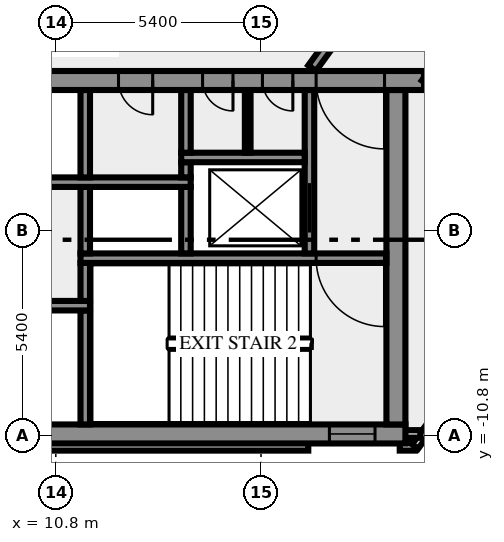
"""IFC4 building model, lengths in metres.
Left out: names, types, materials, properties, quantities, classifications, styles, units other than length and angle.
Written with IfcOpenShell. Run it as: python <this file> out.ifc"""

import sys

from ifc_helpers import new_model, si_unit, direction, frame, frame_2d, origin, place, context, subcontext, project, spatial, rectangle, extrude, element, fill, save


model = new_model("IFC4")
c1 = context("Model", 3, precision=1e-05, world=origin(), true_north=direction((0.0, 1.0)))
c2 = subcontext(c1, "Body", "Model", "MODEL_VIEW")
j1 = project(units=[si_unit("LENGTHUNIT", "METRE"), si_unit("PLANEANGLEUNIT", "RADIAN")], contexts=[c1])
p1 = place(None, origin())
s1 = spatial("IfcSite", under=j1, at=p1, CompositionType="ELEMENT")
p2 = place(p1, origin())
s2 = spatial("IfcBuilding", under=s1, at=p2, CompositionType="ELEMENT")
p3 = place(p2, frame((0.0, 0.0, 93.0)))
s3 = spatial("IfcBuildingStorey", under=s2, at=p3, CompositionType="ELEMENT", Elevation=93.0)
p4 = place(p3, frame((-17.444, -11.088, 0.0), z_axis=(0.0, 0.0, 1.0), x_axis=(1.0, 0.0, 0.0)))
e1 = element("IfcWall", 1, at=p4, inside=s3, PredefinedType="SOLIDWALL", context=c2, shape_type="SweptSolid", body=[
    extrude(rectangle(XDim=34.888, YDim=0.2, at=frame_2d((17.444, 0.0))), origin(), (0.0, 0.0, 1.0), 3.65),
])
p5 = place(p3, frame((19.85, -11.088, 0.0), z_axis=(0.0, 0.0, 1.0), x_axis=(1.0, 0.0, 0.0)))
e2 = element("IfcWall", 2, at=p5, inside=s3, PredefinedType="SOLIDWALL", context=c2, shape_type="SweptSolid", body=[
    extrude(rectangle(XDim=0.406, YDim=0.2, at=frame_2d((0.203, 0.0))), origin(), (0.0, 0.0, 1.0), 3.65),
])
p6 = place(p3, frame((20.253, -11.083, 0.0), z_axis=(0.0, 0.0, 1.0), x_axis=(0.587766567315, 0.809030569476, 0.0)))
e3 = element("IfcWall", 3, at=p6, inside=s3, PredefinedType="SOLIDWALL", context=c2, shape_type="SweptSolid", body=[
    extrude(rectangle(XDim=2.688, YDim=0.2, at=frame_2d((1.344, 0.0))), origin(), (0.0, 0.0, 1.0), 3.65),
])
p7 = place(p3, frame((19.98, -10.75, 0.0), z_axis=(0.0, 0.0, 1.0), x_axis=(1.0, 0.0, 0.0)))
e4 = element("IfcWall", 4, at=p7, inside=s3, PredefinedType="SOLIDWALL", context=c2, shape_type="SweptSolid", body=[
    extrude(rectangle(XDim=0.417, YDim=0.2, at=frame_2d((0.208, 0.0))), origin(), (0.0, 0.0, 1.0), 3.65),
])
p8 = place(p3, frame((-20.0, -10.75, 0.0), z_axis=(0.0, 0.0, 1.0), x_axis=(1.0, 0.0, 0.0)))
e5 = element("IfcWall", 5, at=p8, inside=s3, PredefinedType="SHEAR", context=c2, shape_type="SweptSolid", body=[
    extrude(rectangle(XDim=40.0, YDim=0.5, at=frame_2d((20.0, 0.0))), origin(), (0.0, 0.0, 1.0), 3.65),
])
p9 = place(p8, frame((0.8, 0.0, 1.0)))
e6 = element("IfcOpeningElement", 6, at=p9, cuts=e5, PredefinedType="OPENING", context=c2, shape_type="SweptSolid", body=[
    extrude(rectangle(XDim=1.2, YDim=1.2, at=frame_2d((0.6, 0.6))), frame((0.0, 0.26, 0.0), z_axis=(0.0, -1.0, 0.0), x_axis=(1.0, 0.0, 0.0)), (0.0, 0.0, 1.0), 0.52),
])
p10 = place(p8, frame((38.0, 0.0, 1.0)))
e7 = element("IfcOpeningElement", 7, at=p10, cuts=e5, PredefinedType="OPENING", context=c2, shape_type="SweptSolid", body=[
    extrude(rectangle(XDim=1.2, YDim=1.2, at=frame_2d((0.6, 0.6))), frame((0.0, 0.26, 0.0), z_axis=(0.0, -1.0, 0.0), x_axis=(1.0, 0.0, 0.0)), (0.0, 0.0, 1.0), 0.52),
])
p11 = place(p3, frame((11.575, -10.5, 0.0), z_axis=(0.0, 0.0, 1.0), x_axis=(0.0, 1.0, 0.0)))
e8 = element("IfcWall", 8, at=p11, inside=s3, PredefinedType="SHEAR", context=c2, shape_type="SweptSolid", body=[
    extrude(rectangle(XDim=3.0, YDim=0.25, at=frame_2d((1.5, 0.0))), origin(), (0.0, 0.0, 1.0), 3.65),
])
p12 = place(p3, frame((19.75, -10.5, 0.0), z_axis=(0.0, 0.0, 1.0), x_axis=(0.0, 1.0, 0.0)))
e9 = element("IfcWall", 9, at=p12, inside=s3, PredefinedType="SHEAR", context=c2, shape_type="SweptSolid", body=[
    extrude(rectangle(XDim=8.8, YDim=0.5, at=frame_2d((4.4, 0.0))), origin(), (0.0, 0.0, 1.0), 3.65),
])
p13 = place(p3, frame((11.7, -7.375, 0.0), z_axis=(0.0, 0.0, 1.0), x_axis=(-1.0, 0.0, 0.0)))
e10 = element("IfcWall", 10, at=p13, inside=s3, PredefinedType="SHEAR", context=c2, shape_type="SweptSolid", body=[
    extrude(rectangle(XDim=23.4, YDim=0.25, at=frame_2d((11.7, 0.0))), origin(), (0.0, 0.0, 1.0), 3.65),
])
p14 = place(p13, frame((21.45, 0.0, 0.0)))
e11 = element("IfcOpeningElement", 11, at=p14, cuts=e10, PredefinedType="OPENING", context=c2, shape_type="SweptSolid", body=[
    extrude(rectangle(XDim=1.1, YDim=2.1, at=frame_2d((0.55, 1.05))), frame((0.0, 0.135, 0.0), z_axis=(0.0, -1.0, 0.0), x_axis=(1.0, 0.0, 0.0)), (0.0, 0.0, 1.0), 0.27),
])
p15 = place(p13, frame((18.95, 0.0, 0.0)))
e12 = element("IfcOpeningElement", 12, at=p15, cuts=e10, PredefinedType="OPENING", context=c2, shape_type="SweptSolid", body=[
    extrude(rectangle(XDim=1.1, YDim=2.1, at=frame_2d((0.55, 1.05))), frame((0.0, 0.135, 0.0), z_axis=(0.0, -1.0, 0.0), x_axis=(1.0, 0.0, 0.0)), (0.0, 0.0, 1.0), 0.27),
])
p16 = place(p13, frame((16.45, 0.0, 0.0)))
e13 = element("IfcOpeningElement", 13, at=p16, cuts=e10, PredefinedType="OPENING", context=c2, shape_type="SweptSolid", body=[
    extrude(rectangle(XDim=1.1, YDim=2.1, at=frame_2d((0.55, 1.05))), frame((0.0, 0.135, 0.0), z_axis=(0.0, -1.0, 0.0), x_axis=(1.0, 0.0, 0.0)), (0.0, 0.0, 1.0), 0.27),
])
p17 = place(p13, frame((14.25, 0.0, 0.0)))
e14 = element("IfcOpeningElement", 14, at=p17, cuts=e10, PredefinedType="OPENING", context=c2, shape_type="SweptSolid", body=[
    extrude(rectangle(XDim=0.9, YDim=2.1, at=frame_2d((0.45, 1.05))), frame((0.0, 0.135, 0.0), z_axis=(0.0, -1.0, 0.0), x_axis=(1.0, 0.0, 0.0)), (0.0, 0.0, 1.0), 0.27),
])
p18 = place(p13, frame((12.125, 0.0, 0.0)))
e15 = element("IfcOpeningElement", 15, at=p18, cuts=e10, PredefinedType="OPENING", context=c2, shape_type="SweptSolid", body=[
    extrude(rectangle(XDim=0.9, YDim=2.1, at=frame_2d((0.45, 1.05))), frame((0.0, 0.135, 0.0), z_axis=(0.0, -1.0, 0.0), x_axis=(1.0, 0.0, 0.0)), (0.0, 0.0, 1.0), 0.27),
])
p19 = place(p13, frame((10.45, 0.0, 0.0)))
e16 = element("IfcOpeningElement", 16, at=p19, cuts=e10, PredefinedType="OPENING", context=c2, shape_type="SweptSolid", body=[
    extrude(rectangle(XDim=0.75, YDim=2.1, at=frame_2d((0.375, 1.05))), frame((0.0, 0.135, 0.0), z_axis=(0.0, -1.0, 0.0), x_axis=(1.0, 0.0, 0.0)), (0.0, 0.0, 1.0), 0.27),
])
p20 = place(p3, frame((11.575, -7.25, 0.0), z_axis=(0.0, 0.0, 1.0), x_axis=(0.0, 1.0, 0.0)))
e17 = element("IfcWall", 17, at=p20, inside=s3, PredefinedType="SHEAR", context=c2, shape_type="SweptSolid", body=[
    extrude(rectangle(XDim=1.0, YDim=0.25, at=frame_2d((0.5, 0.0))), origin(), (0.0, 0.0, 1.0), 3.65),
])
p21 = place(p3, frame((19.5, -6.125, 0.0), z_axis=(0.0, 0.0, 1.0), x_axis=(-1.0, 0.0, 0.0)))
e18 = element("IfcWall", 18, at=p21, inside=s3, PredefinedType="SHEAR", context=c2, shape_type="SweptSolid", body=[
    extrude(rectangle(XDim=8.05, YDim=0.25, at=frame_2d((4.025, 0.0))), origin(), (0.0, 0.0, 1.0), 3.65),
])
p22 = place(p21, frame((0.05, 0.0, 0.0)))
e19 = element("IfcOpeningElement", 19, at=p22, cuts=e18, PredefinedType="OPENING", context=c2, shape_type="SweptSolid", body=[
    extrude(rectangle(XDim=1.8, YDim=2.1, at=frame_2d((0.9, 1.05))), frame((0.0, 0.135, 0.0), z_axis=(0.0, -1.0, 0.0), x_axis=(1.0, 0.0, 0.0)), (0.0, 0.0, 1.0), 0.27),
])
for number, where, z_axis, x_axis in (
    (20, (11.575, -6.0, 0.0), (0.0, 0.0, 1.0), (0.0, 1.0, 0.0)),
    (21, (14.225, -6.0, 0.0), (0.0, 0.0, 1.0), (0.0, 1.0, 0.0)),
):
    element("IfcWall", number, at=place(p3, frame(where, z_axis=z_axis, x_axis=x_axis)), inside=s3, PredefinedType="SHEAR", context=c2, shape_type="SweptSolid", body=[
        extrude(rectangle(XDim=1.75, YDim=0.25, at=frame_2d((0.875, 0.0))), origin(), (0.0, 0.0, 1.0), 3.65),
    ])
p23 = place(p3, frame((17.475, -6.0, 0.0), z_axis=(0.0, 0.0, 1.0), x_axis=(0.0, 1.0, 0.0)))
e22 = element("IfcWall", 22, at=p23, inside=s3, PredefinedType="SHEAR", context=c2, shape_type="SweptSolid", body=[
    extrude(rectangle(XDim=4.3, YDim=0.25, at=frame_2d((2.15, 0.0))), origin(), (0.0, 0.0, 1.0), 3.65),
])
p24 = place(p23, frame((0.55, 0.0, 0.0)))
e23 = element("IfcOpeningElement", 23, at=p24, cuts=e22, PredefinedType="OPENING", context=c2, shape_type="SweptSolid", body=[
    extrude(rectangle(XDim=1.3, YDim=2.1, at=frame_2d((0.65, 1.05))), frame((0.0, 0.135, 0.0), z_axis=(0.0, -1.0, 0.0), x_axis=(1.0, 0.0, 0.0)), (0.0, 0.0, 1.0), 0.27),
])
p25 = place(p3, frame((-0.6, -4.125, 0.0), z_axis=(0.0, 0.0, 1.0), x_axis=(1.0, 0.0, 0.0)))
e24 = element("IfcWall", 24, at=p25, inside=s3, PredefinedType="SHEAR", context=c2, shape_type="SweptSolid", body=[
    extrude(rectangle(XDim=14.95, YDim=0.25, at=frame_2d((7.475, 0.0))), origin(), (0.0, 0.0, 1.0), 3.65),
])
p26 = place(p25, frame((2.75, 0.0, 0.0)))
e25 = element("IfcOpeningElement", 25, at=p26, cuts=e24, PredefinedType="OPENING", context=c2, shape_type="SweptSolid", body=[
    extrude(rectangle(XDim=1.3, YDim=2.1, at=frame_2d((0.65, 1.05))), frame((0.0, 0.135, 0.0), z_axis=(0.0, -1.0, 0.0), x_axis=(1.0, 0.0, 0.0)), (0.0, 0.0, 1.0), 0.27),
])
p27 = place(p3, frame((11.575, -4.0, 0.0), z_axis=(0.0, 0.0, 1.0), x_axis=(0.0, 1.0, 0.0)))
e26 = element("IfcWall", 26, at=p27, inside=s3, PredefinedType="SHEAR", context=c2, shape_type="SweptSolid", body=[
    extrude(rectangle(XDim=2.3, YDim=0.25, at=frame_2d((1.15, 0.0))), origin(), (0.0, 0.0, 1.0), 3.65),
])
p28 = place(p3, frame((14.225, -4.0, 0.0), z_axis=(0.0, 0.0, 1.0), x_axis=(0.0, 1.0, 0.0)))
e27 = element("IfcWall", 27, at=p28, inside=s3, PredefinedType="SHEAR", context=c2, shape_type="SweptSolid", body=[
    extrude(rectangle(XDim=0.4, YDim=0.25, at=frame_2d((0.2, 0.0))), origin(), (0.0, 0.0, 1.0), 3.65),
])
p29 = place(p3, frame((14.1, -3.475, 0.0), z_axis=(0.0, 0.0, 1.0), x_axis=(1.0, 0.0, 0.0)))
e28 = element("IfcWall", 28, at=p29, inside=s3, PredefinedType="SHEAR", context=c2, shape_type="SweptSolid", body=[
    extrude(rectangle(XDim=3.25, YDim=0.25, at=frame_2d((1.625, 0.0))), origin(), (0.0, 0.0, 1.0), 3.65),
])
p30 = place(p3, frame((14.225, -3.35, 0.0), z_axis=(0.0, 0.0, 1.0), x_axis=(0.0, 1.0, 0.0)))
e29 = element("IfcWall", 29, at=p30, inside=s3, PredefinedType="SHEAR", context=c2, shape_type="SweptSolid", body=[
    extrude(rectangle(XDim=1.65, YDim=0.25, at=frame_2d((0.825, 0.0))), origin(), (0.0, 0.0, 1.0), 3.65),
])
p31 = place(p3, frame((15.85, -3.35, 0.0), z_axis=(0.0, 0.0, 1.0), x_axis=(0.0, 1.0, 0.0)))
e30 = element("IfcWall", 30, at=p31, inside=s3, PredefinedType="PARTITIONING", context=c2, shape_type="SweptSolid", body=[
    extrude(rectangle(XDim=1.65, YDim=0.15, at=frame_2d((0.825, 0.0))), origin(), (0.0, 0.0, 1.0), 3.65),
])
p32 = place(p3, frame((20.49, -1.45, 0.0), z_axis=(0.0, 0.0, 1.0), x_axis=(-1.0, 0.0, 0.0)))
e31 = element("IfcWall", 31, at=p32, inside=s3, PredefinedType="SHEAR", context=c2, shape_type="SweptSolid", body=[
    extrude(rectangle(XDim=40.98, YDim=0.5, at=frame_2d((20.49, 0.0))), origin(), (0.0, 0.0, 1.0), 3.65),
])
p33 = place(p32, frame((38.14, 0.0, 0.0)))
e32 = element("IfcOpeningElement", 32, at=p33, cuts=e31, PredefinedType="OPENING", context=c2, shape_type="SweptSolid", body=[
    extrude(rectangle(XDim=1.8, YDim=2.1, at=frame_2d((0.9, 1.05))), frame((0.0, 0.26, 0.0), z_axis=(0.0, -1.0, 0.0), x_axis=(1.0, 0.0, 0.0)), (0.0, 0.0, 1.0), 0.52),
])
p34 = place(p32, frame((35.89, 0.0, 0.0)))
e33 = element("IfcOpeningElement", 33, at=p34, cuts=e31, PredefinedType="OPENING", context=c2, shape_type="SweptSolid", body=[
    extrude(rectangle(XDim=0.9, YDim=2.1, at=frame_2d((0.45, 1.05))), frame((0.0, 0.26, 0.0), z_axis=(0.0, -1.0, 0.0), x_axis=(1.0, 0.0, 0.0)), (0.0, 0.0, 1.0), 0.52),
])
p35 = place(p32, frame((32.94, 0.0, 0.0)))
e34 = element("IfcOpeningElement", 34, at=p35, cuts=e31, PredefinedType="OPENING", context=c2, shape_type="SweptSolid", body=[
    extrude(rectangle(XDim=0.9, YDim=2.1, at=frame_2d((0.45, 1.05))), frame((0.0, 0.26, 0.0), z_axis=(0.0, -1.0, 0.0), x_axis=(1.0, 0.0, 0.0)), (0.0, 0.0, 1.0), 0.52),
])
p36 = place(p32, frame((21.765, 0.0, 0.0)))
e35 = element("IfcOpeningElement", 35, at=p36, cuts=e31, PredefinedType="OPENING", context=c2, shape_type="SweptSolid", body=[
    extrude(rectangle(XDim=2.0, YDim=2.1, at=frame_2d((1.0, 1.05))), frame((0.0, 0.26, 0.0), z_axis=(0.0, -1.0, 0.0), x_axis=(1.0, 0.0, 0.0)), (0.0, 0.0, 1.0), 0.52),
])
p37 = place(p32, frame((7.14, 0.0, 0.0)))
e36 = element("IfcOpeningElement", 36, at=p37, cuts=e31, PredefinedType="OPENING", context=c2, shape_type="SweptSolid", body=[
    extrude(rectangle(XDim=0.9, YDim=2.1, at=frame_2d((0.45, 1.05))), frame((0.0, 0.26, 0.0), z_axis=(0.0, -1.0, 0.0), x_axis=(1.0, 0.0, 0.0)), (0.0, 0.0, 1.0), 0.52),
])
p38 = place(p32, frame((5.028, 0.0, 0.0)))
e37 = element("IfcOpeningElement", 37, at=p38, cuts=e31, PredefinedType="OPENING", context=c2, shape_type="SweptSolid", body=[
    extrude(rectangle(XDim=0.8, YDim=2.1, at=frame_2d((0.4, 1.05))), frame((0.0, 0.26, 0.0), z_axis=(0.0, -1.0, 0.0), x_axis=(1.0, 0.0, 0.0)), (0.0, 0.0, 1.0), 0.52),
])
p39 = place(p32, frame((3.452, 0.0, 0.0)))
e38 = element("IfcOpeningElement", 38, at=p39, cuts=e31, PredefinedType="OPENING", context=c2, shape_type="SweptSolid", body=[
    extrude(rectangle(XDim=0.8, YDim=2.1, at=frame_2d((0.4, 1.05))), frame((0.0, 0.26, 0.0), z_axis=(0.0, -1.0, 0.0), x_axis=(1.0, 0.0, 0.0)), (0.0, 0.0, 1.0), 0.52),
])
p40 = place(p32, frame((1.04, 0.0, 0.0)))
e39 = element("IfcOpeningElement", 39, at=p40, cuts=e31, PredefinedType="OPENING", context=c2, shape_type="SweptSolid", body=[
    extrude(rectangle(XDim=1.8, YDim=2.1, at=frame_2d((0.9, 1.05))), frame((0.0, 0.26, 0.0), z_axis=(0.0, -1.0, 0.0), x_axis=(1.0, 0.0, 0.0)), (0.0, 0.0, 1.0), 0.52),
])
p41 = place(p3, frame((17.545, -1.125, 0.0), z_axis=(0.0, 0.0, 1.0), x_axis=(0.587786330937, 0.809016210693, 0.0)))
e40 = element("IfcWall", 40, at=p41, inside=s3, PredefinedType="SOLIDWALL", context=c2, shape_type="SweptSolid", body=[
    extrude(rectangle(XDim=30.103, YDim=0.25, at=frame_2d((15.052, 0.0))), origin(), (0.0, 0.0, 1.0), 3.65),
])
p42 = place(p41, frame((28.679, 0.0, 0.0)))
e41 = element("IfcOpeningElement", 41, at=p42, cuts=e40, PredefinedType="OPENING", context=c2, shape_type="SweptSolid", body=[
    extrude(rectangle(XDim=1.0, YDim=2.1, at=frame_2d((0.5, 1.05))), frame((0.0, 0.135, 0.0), z_axis=(0.0, -1.0, 0.0), x_axis=(1.0, 0.0, 0.0)), (0.0, 0.0, 1.0), 0.27),
])
p43 = place(p41, frame((3.391, 0.0, 0.0)))
e42 = element("IfcOpeningElement", 42, at=p43, cuts=e40, PredefinedType="OPENING", context=c2, shape_type="SweptSolid", body=[
    extrude(rectangle(XDim=1.0, YDim=2.1, at=frame_2d((0.5, 1.05))), frame((0.0, 0.135, 0.0), z_axis=(0.0, -1.0, 0.0), x_axis=(1.0, 0.0, 0.0)), (0.0, 0.0, 1.0), 0.27),
])
p44 = place(p3, frame((37.236, 21.469, 0.0), z_axis=(0.0, 0.0, 1.0), x_axis=(-0.58778344073, -0.809018310549, 0.0)))
e43 = element("IfcWall", 43, at=p44, inside=s3, PredefinedType="SOLIDWALL", context=c2, shape_type="SweptSolid", body=[
    extrude(rectangle(XDim=28.42, YDim=0.25, at=frame_2d((14.21, 0.0))), origin(), (0.0, 0.0, 1.0), 3.65),
])
p45 = place(p44, frame((26.137, 0.0, 0.0)))
e44 = element("IfcOpeningElement", 44, at=p45, cuts=e43, PredefinedType="OPENING", context=c2, shape_type="SweptSolid", body=[
    extrude(rectangle(XDim=1.8, YDim=2.1, at=frame_2d((0.9, 1.05))), frame((0.0, 0.135, 0.0), z_axis=(0.0, -1.0, 0.0), x_axis=(1.0, 0.0, 0.0)), (0.0, 0.0, 1.0), 0.27),
])
p46 = place(p44, frame((0.175, 0.0, 0.0)))
e45 = element("IfcOpeningElement", 45, at=p46, cuts=e43, PredefinedType="OPENING", context=c2, shape_type="SweptSolid", body=[
    extrude(rectangle(XDim=1.8, YDim=2.1, at=frame_2d((0.9, 1.05))), frame((0.0, 0.135, 0.0), z_axis=(0.0, -1.0, 0.0), x_axis=(1.0, 0.0, 0.0)), (0.0, 0.0, 1.0), 0.27),
])
p47 = place(p10, origin())
e46 = element("IfcWindow", 46, at=p47, inside=s3, PartitioningType="SINGLE_PANEL", PredefinedType="WINDOW", context=c2, shape_type="SweptSolid", body=[
    extrude(rectangle(XDim=1.2, YDim=1.2, at=frame_2d((0.6, 0.6))), frame((0.0, 0.03, 0.0), z_axis=(0.0, -1.0, 0.0), x_axis=(1.0, 0.0, 0.0)), (0.0, 0.0, 1.0), 0.06),
])
fill(e7, e46)
p48 = place(p22, origin())
e47 = element("IfcDoor", 47, at=p48, inside=s3, OperationType="DOUBLE_DOOR_SINGLE_SWING", PredefinedType="DOOR", context=c2, shape_type="SweptSolid", body=[
    extrude(rectangle(XDim=1.8, YDim=2.1, at=frame_2d((0.9, 1.05))), frame((0.0, 0.025, 0.0), z_axis=(0.0, -1.0, 0.0), x_axis=(1.0, 0.0, 0.0)), (0.0, 0.0, 1.0), 0.05),
])
fill(e19, e47)
p49 = place(p24, origin())
e48 = element("IfcDoor", 48, at=p49, inside=s3, OperationType="DOUBLE_DOOR_SLIDING", PredefinedType="DOOR", context=c2, shape_type="SweptSolid", body=[
    extrude(rectangle(XDim=1.3, YDim=2.1, at=frame_2d((0.65, 1.05))), frame((0.0, 0.025, 0.0), z_axis=(0.0, -1.0, 0.0), x_axis=(1.0, 0.0, 0.0)), (0.0, 0.0, 1.0), 0.05),
])
fill(e23, e48)
p50 = place(p37, origin())
e49 = element("IfcDoor", 49, at=p50, inside=s3, OperationType="SINGLE_SWING_LEFT", PredefinedType="DOOR", context=c2, shape_type="SweptSolid", body=[
    extrude(rectangle(XDim=0.9, YDim=2.1, at=frame_2d((0.45, 1.05))), frame((0.0, 0.025, 0.0), z_axis=(0.0, -1.0, 0.0), x_axis=(1.0, 0.0, 0.0)), (0.0, 0.0, 1.0), 0.05),
])
fill(e36, e49)
p51 = place(p38, origin())
e50 = element("IfcDoor", 50, at=p51, inside=s3, OperationType="SINGLE_SWING_LEFT", PredefinedType="DOOR", context=c2, shape_type="SweptSolid", body=[
    extrude(rectangle(XDim=0.8, YDim=2.1, at=frame_2d((0.4, 1.05))), frame((0.0, 0.025, 0.0), z_axis=(0.0, -1.0, 0.0), x_axis=(1.0, 0.0, 0.0)), (0.0, 0.0, 1.0), 0.05),
])
fill(e37, e50)
p52 = place(p39, origin())
e51 = element("IfcDoor", 51, at=p52, inside=s3, OperationType="SINGLE_SWING_LEFT", PredefinedType="DOOR", context=c2, shape_type="SweptSolid", body=[
    extrude(rectangle(XDim=0.8, YDim=2.1, at=frame_2d((0.4, 1.05))), frame((0.0, 0.025, 0.0), z_axis=(0.0, -1.0, 0.0), x_axis=(1.0, 0.0, 0.0)), (0.0, 0.0, 1.0), 0.05),
])
fill(e38, e51)
p53 = place(p40, origin())
e52 = element("IfcDoor", 52, at=p53, inside=s3, OperationType="DOUBLE_DOOR_SINGLE_SWING", PredefinedType="DOOR", context=c2, shape_type="SweptSolid", body=[
    extrude(rectangle(XDim=1.8, YDim=2.1, at=frame_2d((0.9, 1.05))), frame((0.0, 0.025, 0.0), z_axis=(0.0, -1.0, 0.0), x_axis=(1.0, 0.0, 0.0)), (0.0, 0.0, 1.0), 0.05),
])
fill(e39, e52)
save(model, sys.argv[1])
